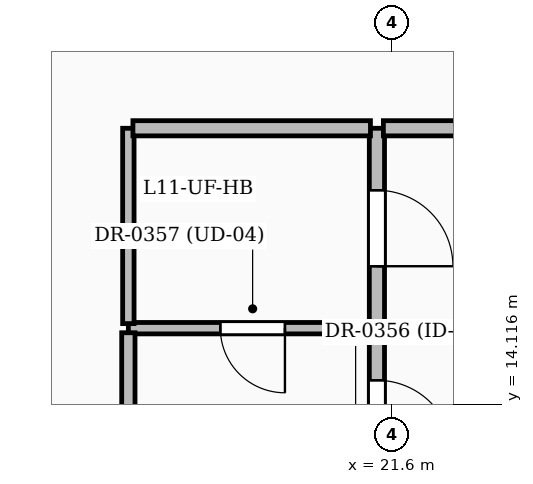
"""IFC4 building model, lengths in metres.
Left out: names, types, materials, properties, quantities, classifications, styles, units other than length and angle.
Written with IfcOpenShell. Run it as: python <this file> out.ifc"""

import sys

from ifc_helpers import new_model, si_unit, direction, frame, frame_2d, origin, place, context, subcontext, project, spatial, rectangle, extrude, element, fill, save


model = new_model("IFC4")
c1 = context("Model", 3, precision=1e-05, world=origin(), true_north=direction((0.0, 1.0)))
c2 = subcontext(c1, "Body", "Model", "MODEL_VIEW")
j1 = project(units=[si_unit("LENGTHUNIT", "METRE"), si_unit("PLANEANGLEUNIT", "RADIAN")], contexts=[c1])
p1 = place(None, origin())
s1 = spatial("IfcSite", under=j1, at=p1, CompositionType="ELEMENT")
p2 = place(p1, origin())
s2 = spatial("IfcBuilding", under=s1, at=p2, CompositionType="ELEMENT")
p3 = place(p2, frame((0.0, 0.0, 49.8)))
s3 = spatial("IfcBuildingStorey", under=s2, at=p3, CompositionType="ELEMENT", Elevation=49.8)
p4 = place(p3, frame((14.372, 17.049, 0.0), z_axis=(0.0, 0.0, 1.0), x_axis=(0.539499522652, 0.841985905498, 0.0)))
e1 = element("IfcWall", 1, at=p4, inside=s3, PredefinedType="SOLIDWALL", context=c2, shape_type="SweptSolid", body=[
    extrude(rectangle(XDim=6.525, YDim=0.3, at=frame_2d((3.263, 0.0))), origin(), (0.0, 0.0, 1.0), 3.35),
])
p5 = place(p4, frame((2.45, 0.0, 0.6)))
e2 = element("IfcOpeningElement", 2, at=p5, cuts=e1, PredefinedType="OPENING", context=c2, shape_type="SweptSolid", body=[
    extrude(rectangle(XDim=2.4, YDim=2.1, at=frame_2d((1.2, 1.05))), frame((0.0, 0.16, 0.0), z_axis=(0.0, -1.0, 0.0), x_axis=(1.0, 0.0, 0.0)), (0.0, 0.0, 1.0), 0.32),
])
p6 = place(p3, frame((21.4, 15.12, 0.0), z_axis=(0.0, 0.0, 1.0), x_axis=(0.0, -1.0, 0.0)))
e3 = element("IfcWall", 3, at=p6, inside=s3, PredefinedType="PARTITIONING", context=c2, shape_type="SweptSolid", body=[
    extrude(rectangle(XDim=2.37, YDim=0.2, at=frame_2d((1.185, 0.0))), origin(), (0.0, 0.0, 1.0), 2.911),
])
p7 = place(p6, frame((0.685, 0.0, 0.0)))
e4 = element("IfcOpeningElement", 4, at=p7, cuts=e3, PredefinedType="OPENING", context=c2, shape_type="SweptSolid", body=[
    extrude(rectangle(XDim=1.0, YDim=2.2, at=frame_2d((0.5, 1.1))), frame((0.0, 0.11, 0.0), z_axis=(0.0, -1.0, 0.0), x_axis=(1.0, 0.0, 0.0)), (0.0, 0.0, 1.0), 0.22),
])
p8 = place(p3, frame((21.4, 17.75, 0.0), z_axis=(0.0, 0.0, 1.0), x_axis=(0.0, -1.0, 0.0)))
e5 = element("IfcWall", 5, at=p8, inside=s3, PredefinedType="PARTITIONING", context=c2, shape_type="SweptSolid", body=[
    extrude(rectangle(XDim=2.63, YDim=0.2, at=frame_2d((1.315, 0.0))), origin(), (0.0, 0.0, 1.0), 2.911),
])
p9 = place(p8, frame((0.815, 0.0, 0.0)))
e6 = element("IfcOpeningElement", 6, at=p9, cuts=e5, PredefinedType="OPENING", context=c2, shape_type="SweptSolid", body=[
    extrude(rectangle(XDim=1.0, YDim=2.2, at=frame_2d((0.5, 1.1))), frame((0.0, 0.11, 0.0), z_axis=(0.0, -1.0, 0.0), x_axis=(1.0, 0.0, 0.0)), (0.0, 0.0, 1.0), 0.22),
])
p10 = place(p3, frame((27.43, 17.75, 0.0), z_axis=(0.0, 0.0, 1.0), x_axis=(-1.0, 0.0, 0.0)))
e7 = element("IfcWall", 7, at=p10, inside=s3, PredefinedType="PARTITIONING", context=c2, shape_type="SweptSolid", body=[
    extrude(rectangle(XDim=5.945, YDim=0.2, at=frame_2d((2.972, 0.0))), origin(), (0.0, 0.0, 1.0), 1.12),
])
p11 = place(p3, frame((21.315, 15.12, 0.0), z_axis=(0.0, 0.0, 1.0), x_axis=(-1.0, 0.0, 0.0)))
e8 = element("IfcWall", 8, at=p11, inside=s3, PredefinedType="PARTITIONING", context=c2, shape_type="SweptSolid", body=[
    extrude(rectangle(XDim=3.185, YDim=0.15, at=frame_2d((1.593, 0.0))), origin(), (0.0, 0.0, 1.0), 2.911),
])
p12 = place(p11, frame((1.125, 0.0, 0.0)))
e9 = element("IfcOpeningElement", 9, at=p12, cuts=e8, PredefinedType="OPENING", context=c2, shape_type="SweptSolid", body=[
    extrude(rectangle(XDim=0.85, YDim=2.1, at=frame_2d((0.425, 1.05))), frame((0.0, 0.085, 0.0), z_axis=(0.0, -1.0, 0.0), x_axis=(1.0, 0.0, 0.0)), (0.0, 0.0, 1.0), 0.17),
])
p13 = place(p3, frame((18.13, 15.06, 0.0), z_axis=(0.0, 0.0, 1.0), x_axis=(0.0, -1.0, 0.0)))
e10 = element("IfcWall", 10, at=p13, inside=s3, PredefinedType="PARTITIONING", context=c2, shape_type="SweptSolid", body=[
    extrude(rectangle(XDim=3.39, YDim=0.175, at=frame_2d((1.695, 0.0))), origin(), (0.0, 0.0, 1.0), 2.911),
])
p14 = place(p3, frame((18.13, 17.75, 0.0), z_axis=(0.0, 0.0, 1.0), x_axis=(0.0, -1.0, 0.0)))
e11 = element("IfcWall", 11, at=p14, inside=s3, PredefinedType="PARTITIONING", context=c2, shape_type="SweptSolid", body=[
    extrude(rectangle(XDim=2.57, YDim=0.15, at=frame_2d((1.285, 0.0))), origin(), (0.0, 0.0, 1.0), 3.35),
])
p15 = place(p3, frame((21.315, 17.75, 0.0), z_axis=(0.0, 0.0, 1.0), x_axis=(-1.0, 0.0, 0.0)))
e12 = element("IfcWall", 12, at=p15, inside=s3, PredefinedType="PARTITIONING", context=c2, shape_type="SweptSolid", body=[
    extrude(rectangle(XDim=3.125, YDim=0.2, at=frame_2d((1.562, 0.0))), origin(), (0.0, 0.0, 1.0), 2.911),
])
p16 = place(p7, origin())
e13 = element("IfcDoor", 13, at=p16, inside=s3, OperationType="SINGLE_SWING_RIGHT", PredefinedType="DOOR", context=c2, shape_type="SweptSolid", body=[
    extrude(rectangle(XDim=1.0, YDim=2.2, at=frame_2d((0.5, 1.1))), frame((0.0, 0.025, 0.0), z_axis=(0.0, -1.0, 0.0), x_axis=(1.0, 0.0, 0.0)), (0.0, 0.0, 1.0), 0.05),
])
fill(e4, e13)
p17 = place(p12, origin())
e14 = element("IfcDoor", 14, at=p17, inside=s3, OperationType="SINGLE_SWING_LEFT", PredefinedType="DOOR", context=c2, shape_type="SweptSolid", body=[
    extrude(rectangle(XDim=0.85, YDim=2.1, at=frame_2d((0.425, 1.05))), frame((0.0, 0.025, 0.0), z_axis=(0.0, -1.0, 0.0), x_axis=(1.0, 0.0, 0.0)), (0.0, 0.0, 1.0), 0.05),
])
fill(e9, e14)
p18 = place(p9, origin())
e15 = element("IfcDoor", 15, at=p18, inside=s3, OperationType="SINGLE_SWING_RIGHT", PredefinedType="DOOR", context=c2, shape_type="SweptSolid", body=[
    extrude(rectangle(XDim=1.0, YDim=2.2, at=frame_2d((0.5, 1.1))), frame((0.0, 0.025, 0.0), z_axis=(0.0, -1.0, 0.0), x_axis=(1.0, 0.0, 0.0)), (0.0, 0.0, 1.0), 0.05),
])
fill(e6, e15)
save(model, sys.argv[1])
